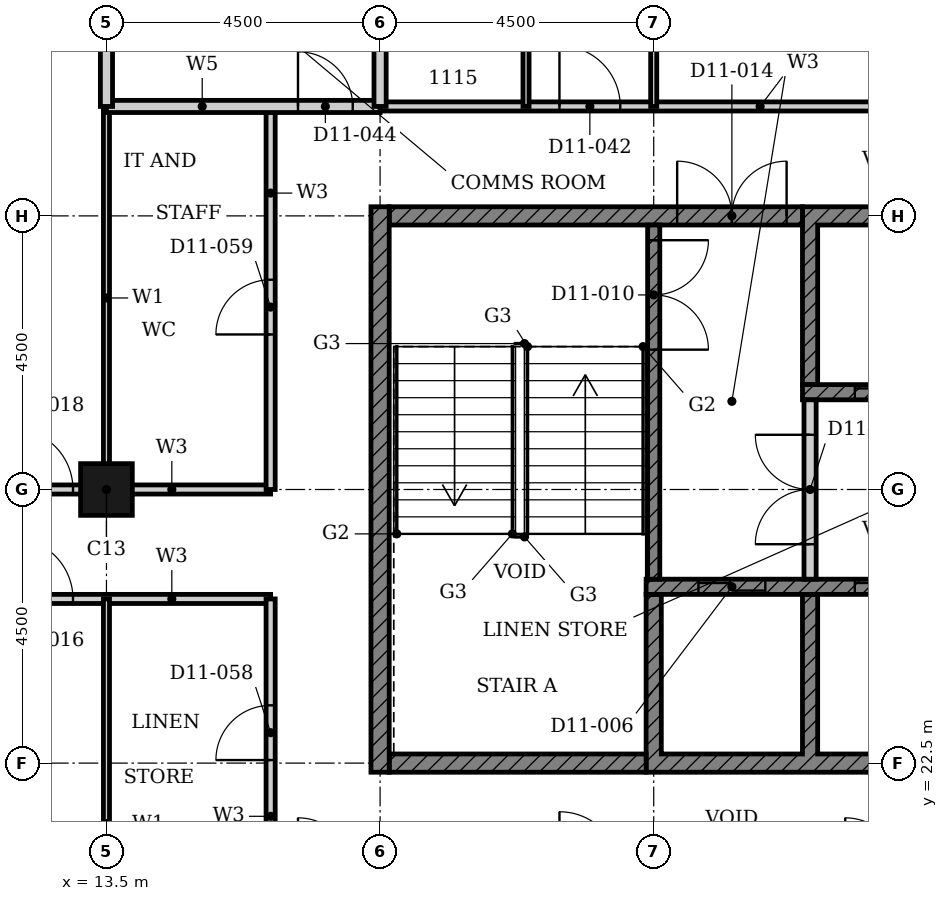
"""IFC4 building model, lengths in metres.
Left out: names, types, materials, properties, quantities, classifications, styles, units other than length and angle.
Written with IfcOpenShell. Run it as: python <this file> out.ifc"""

import sys

from ifc_helpers import new_model, si_unit, direction, frame, frame_2d, origin, origin_2d, place, context, subcontext, project, spatial, polyline, rectangle, hollow_rectangle, outline, extrude, element, fill, save


model = new_model("IFC4")
c1 = context("Model", 3, precision=1e-05, world=origin(), true_north=direction((0.0, 1.0)))
c2 = subcontext(c1, "Body", "Model", "MODEL_VIEW")
j1 = project(units=[si_unit("LENGTHUNIT", "METRE"), si_unit("PLANEANGLEUNIT", "RADIAN")], contexts=[c1])
p1 = place(None, origin())
s1 = spatial("IfcSite", under=j1, at=p1, CompositionType="ELEMENT")
p2 = place(p1, origin())
s2 = spatial("IfcBuilding", under=s1, at=p2, CompositionType="ELEMENT")
p3 = place(p2, frame((0.0, 0.0, 52.8)))
s3 = spatial("IfcBuildingStorey", under=s2, at=p3, CompositionType="ELEMENT", Elevation=52.8)
p4 = place(p3, frame((13.5, 27.0, 0.0), z_axis=(0.0, 0.0, 1.0), x_axis=(1.0, 0.0, 0.0)))
e1 = element("IfcColumn", 1, at=p4, inside=s3, PredefinedType="COLUMN", context=c2, shape_type="SweptSolid", body=[
    extrude(hollow_rectangle(XDim=0.85, YDim=0.85, WallThickness=0.026, at=origin_2d()), origin(), (0.0, 0.0, 1.0), 3.6),
])
p5 = place(p3, origin())
e2 = element("IfcWall", 2, at=p5, inside=s3, PredefinedType="SHEAR", context=c2, shape_type="SweptSolid", body=[
    extrude(outline(polyline([(22.375, 22.35), (38.053, 22.35), (38.053, 25.275), (37.803, 25.275), (37.803, 22.65), (35.482, 22.65), (35.482, 25.275), (35.232, 25.275), (35.232, 22.65), (32.911, 22.65), (32.911, 25.275), (32.661, 25.275), (32.661, 22.65), (30.339, 22.65), (30.339, 25.275), (30.089, 25.275), (30.089, 22.65), (27.768, 22.65), (27.768, 25.275), (27.518, 25.275), (27.518, 22.65), (25.197, 22.65), (25.197, 25.275), (24.947, 25.275), (24.947, 22.65), (22.625, 22.65), (22.625, 25.275), (22.375, 25.275), (22.375, 22.35)])), origin(), (0.0, 0.0, 1.0), 3.3),
])
p6 = place(p3, origin())
e3 = element("IfcWall", 3, at=p6, inside=s3, PredefinedType="SHEAR", context=c2, shape_type="SweptSolid", body=[
    extrude(outline(polyline([(24.947, 28.725), (25.197, 28.725), (25.197, 31.35), (27.518, 31.35), (27.518, 28.725), (27.768, 28.725), (27.768, 31.35), (30.089, 31.35), (30.089, 28.725), (30.339, 28.725), (30.339, 31.35), (32.661, 31.35), (32.661, 28.725), (32.911, 28.725), (32.911, 31.35), (35.232, 31.35), (35.232, 28.725), (35.482, 28.725), (35.482, 31.35), (37.803, 31.35), (37.803, 28.725), (38.053, 28.725), (38.053, 31.35), (40.375, 31.35), (40.375, 28.725), (40.625, 28.725), (40.625, 31.65), (24.947, 31.65), (24.947, 28.725)])), origin(), (0.0, 0.0, 1.0), 3.3),
])
p7 = place(p3, frame((18.15, 22.5, 0.0), z_axis=(0.0, 0.0, 1.0), x_axis=(1.0, 0.0, 0.0)))
e4 = element("IfcWall", 4, at=p7, inside=s3, PredefinedType="SHEAR", context=c2, shape_type="SweptSolid", body=[
    extrude(rectangle(XDim=4.225, YDim=0.3, at=frame_2d((2.113, 0.0))), origin(), (0.0, 0.0, 1.0), 3.3),
])
p8 = place(p3, frame((18.15, 31.5, 0.0), z_axis=(0.0, 0.0, 1.0), x_axis=(1.0, 0.0, 0.0)))
e5 = element("IfcWall", 5, at=p8, inside=s3, PredefinedType="SHEAR", context=c2, shape_type="SweptSolid", body=[
    extrude(rectangle(XDim=6.797, YDim=0.3, at=frame_2d((3.398, 0.0))), origin(), (0.0, 0.0, 1.0), 3.3),
])
p9 = place(p8, frame((4.736, 0.0, 0.0)))
e6 = element("IfcOpeningElement", 6, at=p9, cuts=e5, PredefinedType="OPENING", context=c2, shape_type="SweptSolid", body=[
    extrude(rectangle(XDim=1.8, YDim=2.1, at=frame_2d((0.9, 1.05))), frame((0.0, 0.16, 0.0), z_axis=(0.0, -1.0, 0.0), x_axis=(1.0, 0.0, 0.0)), (0.0, 0.0, 1.0), 0.32),
])
p10 = place(p3, frame((18.0, 22.35, 0.0), z_axis=(0.0, 0.0, 1.0), x_axis=(0.0, 1.0, 0.0)))
e7 = element("IfcWall", 7, at=p10, inside=s3, PredefinedType="SHEAR", context=c2, shape_type="SweptSolid", body=[
    extrude(rectangle(XDim=9.3, YDim=0.3, at=frame_2d((4.65, 0.0))), origin(), (0.0, 0.0, 1.0), 3.3),
])
p11 = place(p3, frame((22.375, 25.4, 0.0), z_axis=(0.0, 0.0, 1.0), x_axis=(1.0, 0.0, 0.0)))
e8 = element("IfcWall", 8, at=p11, inside=s3, PredefinedType="SHEAR", context=c2, shape_type="SweptSolid", body=[
    extrude(rectangle(XDim=15.678, YDim=0.25, at=frame_2d((7.839, 0.0))), origin(), (0.0, 0.0, 1.0), 3.3),
])
p12 = place(p11, frame((3.432, 0.0, 0.0)))
e9 = element("IfcOpeningElement", 9, at=p12, cuts=e8, PredefinedType="OPENING", context=c2, shape_type="SweptSolid", body=[
    extrude(rectangle(XDim=1.1, YDim=2.1, at=frame_2d((0.55, 1.05))), frame((0.0, 0.135, 0.0), z_axis=(0.0, -1.0, 0.0), x_axis=(1.0, 0.0, 0.0)), (0.0, 0.0, 1.0), 0.27),
])
p13 = place(p11, frame((11.146, 0.0, 0.0)))
e10 = element("IfcOpeningElement", 10, at=p13, cuts=e8, PredefinedType="OPENING", context=c2, shape_type="SweptSolid", body=[
    extrude(rectangle(XDim=1.1, YDim=2.1, at=frame_2d((0.55, 1.05))), frame((0.0, 0.135, 0.0), z_axis=(0.0, -1.0, 0.0), x_axis=(1.0, 0.0, 0.0)), (0.0, 0.0, 1.0), 0.27),
])
p14 = place(p11, frame((13.718, 0.0, 0.0)))
e11 = element("IfcOpeningElement", 11, at=p14, cuts=e8, PredefinedType="OPENING", context=c2, shape_type="SweptSolid", body=[
    extrude(rectangle(XDim=1.1, YDim=2.1, at=frame_2d((0.55, 1.05))), frame((0.0, 0.135, 0.0), z_axis=(0.0, -1.0, 0.0), x_axis=(1.0, 0.0, 0.0)), (0.0, 0.0, 1.0), 0.27),
])
p15 = place(p11, frame((0.861, 0.0, 0.0)))
e12 = element("IfcOpeningElement", 12, at=p15, cuts=e8, PredefinedType="OPENING", context=c2, shape_type="SweptSolid", body=[
    extrude(rectangle(XDim=1.1, YDim=2.1, at=frame_2d((0.55, 1.05))), frame((0.0, 0.135, 0.0), z_axis=(0.0, -1.0, 0.0), x_axis=(1.0, 0.0, 0.0)), (0.0, 0.0, 1.0), 0.27),
])
p16 = place(p3, frame((24.947, 28.6, 0.0), z_axis=(0.0, 0.0, 1.0), x_axis=(1.0, 0.0, 0.0)))
e13 = element("IfcWall", 13, at=p16, inside=s3, PredefinedType="SHEAR", context=c2, shape_type="SweptSolid", body=[
    extrude(rectangle(XDim=15.678, YDim=0.25, at=frame_2d((7.839, 0.0))), origin(), (0.0, 0.0, 1.0), 3.3),
])
p17 = place(p16, frame((0.861, 0.0, 0.0)))
e14 = element("IfcOpeningElement", 14, at=p17, cuts=e13, PredefinedType="OPENING", context=c2, shape_type="SweptSolid", body=[
    extrude(rectangle(XDim=1.1, YDim=2.1, at=frame_2d((0.55, 1.05))), frame((0.0, 0.135, 0.0), z_axis=(0.0, -1.0, 0.0), x_axis=(1.0, 0.0, 0.0)), (0.0, 0.0, 1.0), 0.27),
])
p18 = place(p16, frame((8.575, 0.0, 0.0)))
e15 = element("IfcOpeningElement", 15, at=p18, cuts=e13, PredefinedType="OPENING", context=c2, shape_type="SweptSolid", body=[
    extrude(rectangle(XDim=1.1, YDim=2.1, at=frame_2d((0.55, 1.05))), frame((0.0, 0.135, 0.0), z_axis=(0.0, -1.0, 0.0), x_axis=(1.0, 0.0, 0.0)), (0.0, 0.0, 1.0), 0.27),
])
p19 = place(p16, frame((13.718, 0.0, 0.0)))
e16 = element("IfcOpeningElement", 16, at=p19, cuts=e13, PredefinedType="OPENING", context=c2, shape_type="SweptSolid", body=[
    extrude(rectangle(XDim=1.1, YDim=2.1, at=frame_2d((0.55, 1.05))), frame((0.0, 0.135, 0.0), z_axis=(0.0, -1.0, 0.0), x_axis=(1.0, 0.0, 0.0)), (0.0, 0.0, 1.0), 0.27),
])
p20 = place(p3, frame((22.5, 31.35, 0.0), z_axis=(0.0, 0.0, 1.0), x_axis=(0.0, -1.0, 0.0)))
e17 = element("IfcWall", 17, at=p20, inside=s3, PredefinedType="SHEAR", context=c2, shape_type="SweptSolid", body=[
    extrude(rectangle(XDim=5.825, YDim=0.2, at=frame_2d((2.913, 0.0))), origin(), (0.0, 0.0, 1.0), 3.3),
])
p21 = place(p20, frame((0.25, 0.0, 0.0)))
e18 = element("IfcOpeningElement", 18, at=p21, cuts=e17, PredefinedType="OPENING", context=c2, shape_type="SweptSolid", body=[
    extrude(rectangle(XDim=1.8, YDim=2.1, at=frame_2d((0.9, 1.05))), frame((0.0, 0.11, 0.0), z_axis=(0.0, -1.0, 0.0), x_axis=(1.0, 0.0, 0.0)), (0.0, 0.0, 1.0), 0.22),
])
p22 = place(p3, frame((25.072, 25.525, 0.0), z_axis=(0.0, 0.0, 1.0), x_axis=(0.0, 1.0, 0.0)))
e19 = element("IfcWall", 19, at=p22, inside=s3, PredefinedType="PARTITIONING", context=c2, shape_type="SweptSolid", body=[
    extrude(rectangle(XDim=2.95, YDim=0.2, at=frame_2d((1.475, 0.0))), origin(), (0.0, 0.0, 1.0), 3.3),
])
p23 = place(p22, frame((0.575, 0.0, 0.0)))
e20 = element("IfcOpeningElement", 20, at=p23, cuts=e19, PredefinedType="OPENING", context=c2, shape_type="SweptSolid", body=[
    extrude(rectangle(XDim=1.8, YDim=2.1, at=frame_2d((0.9, 1.05))), frame((0.0, 0.11, 0.0), z_axis=(0.0, -1.0, 0.0), x_axis=(1.0, 0.0, 0.0)), (0.0, 0.0, 1.0), 0.22),
])
p24 = place(p3, frame((9.0, 25.2, 0.0), z_axis=(0.0, 0.0, 1.0), x_axis=(1.0, 0.0, 0.0)))
e21 = element("IfcWall", 21, at=p24, inside=s3, PredefinedType="PARTITIONING", context=c2, shape_type="SweptSolid", body=[
    extrude(rectangle(XDim=7.2, YDim=0.15, at=frame_2d((3.6, 0.0))), origin(), (0.0, 0.0, 1.0), 3.3),
])
p25 = place(p24, frame((2.95, 0.0, 0.0)))
e22 = element("IfcOpeningElement", 22, at=p25, cuts=e21, PredefinedType="OPENING", context=c2, shape_type="SweptSolid", body=[
    extrude(rectangle(XDim=1.0, YDim=2.1, at=frame_2d((0.5, 1.05))), frame((0.0, 0.085, 0.0), z_axis=(0.0, -1.0, 0.0), x_axis=(1.0, 0.0, 0.0)), (0.0, 0.0, 1.0), 0.17),
])
p26 = place(p3, frame((9.0, 27.0, 0.0), z_axis=(0.0, 0.0, 1.0), x_axis=(1.0, 0.0, 0.0)))
e23 = element("IfcWall", 23, at=p26, inside=s3, PredefinedType="PARTITIONING", context=c2, shape_type="SweptSolid", body=[
    extrude(rectangle(XDim=7.2, YDim=0.15, at=frame_2d((3.6, 0.0))), origin(), (0.0, 0.0, 1.0), 2.58),
])
p27 = place(p26, frame((2.95, 0.0, 0.0)))
e24 = element("IfcOpeningElement", 24, at=p27, cuts=e23, PredefinedType="OPENING", context=c2, shape_type="SweptSolid", body=[
    extrude(rectangle(XDim=1.0, YDim=2.1, at=frame_2d((0.5, 1.05))), frame((0.0, 0.085, 0.0), z_axis=(0.0, -1.0, 0.0), x_axis=(1.0, 0.0, 0.0)), (0.0, 0.0, 1.0), 0.17),
])
p28 = place(p3, frame((18.0, 33.3, 0.0), z_axis=(0.0, 0.0, 1.0), x_axis=(1.0, 0.0, 0.0)))
e25 = element("IfcWall", 25, at=p28, inside=s3, PredefinedType="PARTITIONING", context=c2, shape_type="SweptSolid", body=[
    extrude(rectangle(XDim=13.5, YDim=0.15, at=frame_2d((6.75, 0.0))), origin(), (0.0, 0.0, 1.0), 3.3),
])
p29 = place(p28, frame((2.95, 0.0, 0.0)))
e26 = element("IfcOpeningElement", 26, at=p29, cuts=e25, PredefinedType="OPENING", context=c2, shape_type="SweptSolid", body=[
    extrude(rectangle(XDim=1.0, YDim=2.1, at=frame_2d((0.5, 1.05))), frame((0.0, 0.085, 0.0), z_axis=(0.0, -1.0, 0.0), x_axis=(1.0, 0.0, 0.0)), (0.0, 0.0, 1.0), 0.17),
])
p30 = place(p28, frame((8.55, 0.0, 0.0)))
e27 = element("IfcOpeningElement", 27, at=p30, cuts=e25, PredefinedType="OPENING", context=c2, shape_type="SweptSolid", body=[
    extrude(rectangle(XDim=0.9, YDim=2.1, at=frame_2d((0.45, 1.05))), frame((0.0, 0.085, 0.0), z_axis=(0.0, -1.0, 0.0), x_axis=(1.0, 0.0, 0.0)), (0.0, 0.0, 1.0), 0.17),
])
p31 = place(p3, frame((16.2, 27.0, 0.0), z_axis=(0.0, 0.0, 1.0), x_axis=(0.0, 1.0, 0.0)))
e28 = element("IfcWall", 28, at=p31, inside=s3, PredefinedType="PARTITIONING", context=c2, shape_type="SweptSolid", body=[
    extrude(rectangle(XDim=6.3, YDim=0.15, at=frame_2d((3.15, 0.0))), origin(), (0.0, 0.0, 1.0), 3.3),
])
p32 = place(p31, frame((2.55, 0.0, 0.0)))
e29 = element("IfcOpeningElement", 29, at=p32, cuts=e28, PredefinedType="OPENING", context=c2, shape_type="SweptSolid", body=[
    extrude(rectangle(XDim=0.9, YDim=2.1, at=frame_2d((0.45, 1.05))), frame((0.0, 0.085, 0.0), z_axis=(0.0, -1.0, 0.0), x_axis=(1.0, 0.0, 0.0)), (0.0, 0.0, 1.0), 0.17),
])
p33 = place(p3, frame((16.2, 20.7, 0.0), z_axis=(0.0, 0.0, 1.0), x_axis=(0.0, 1.0, 0.0)))
e30 = element("IfcWall", 30, at=p33, inside=s3, PredefinedType="PARTITIONING", context=c2, shape_type="SweptSolid", body=[
    extrude(rectangle(XDim=4.5, YDim=0.15, at=frame_2d((2.25, 0.0))), origin(), (0.0, 0.0, 1.0), 3.3),
])
p34 = place(p33, frame((1.85, 0.0, 0.0)))
e31 = element("IfcOpeningElement", 31, at=p34, cuts=e30, PredefinedType="OPENING", context=c2, shape_type="SweptSolid", body=[
    extrude(rectangle(XDim=0.9, YDim=2.1, at=frame_2d((0.45, 1.05))), frame((0.0, 0.085, 0.0), z_axis=(0.0, -1.0, 0.0), x_axis=(1.0, 0.0, 0.0)), (0.0, 0.0, 1.0), 0.17),
])
p35 = place(p3, frame((13.5, 27.0, 0.0), z_axis=(0.0, 0.0, 1.0), x_axis=(0.0, 1.0, 0.0)))
e32 = element("IfcWall", 32, at=p35, inside=s3, PredefinedType="PARTITIONING", context=c2, shape_type="SweptSolid", body=[
    extrude(rectangle(XDim=6.3, YDim=0.1, at=frame_2d((3.15, 0.0))), origin(), (0.0, 0.0, 1.0), 2.38),
])
p36 = place(p3, frame((13.5, 17.81, 0.0), z_axis=(0.0, 0.0, 1.0), x_axis=(0.0, 1.0, 0.0)))
e33 = element("IfcWall", 33, at=p36, inside=s3, PredefinedType="PARTITIONING", context=c2, shape_type="SweptSolid", body=[
    extrude(rectangle(XDim=7.39, YDim=0.1, at=frame_2d((3.695, 0.0))), origin(), (0.0, 0.0, 1.0), 2.38),
])
p37 = place(p3, frame((22.5, 33.3, 0.0), z_axis=(0.0, 0.0, 1.0), x_axis=(0.0, 1.0, 0.0)))
e34 = element("IfcWall", 34, at=p37, inside=s3, PredefinedType="PARTITIONING", context=c2, shape_type="SweptSolid", body=[
    extrude(rectangle(XDim=7.39, YDim=0.1, at=frame_2d((3.695, 0.0))), origin(), (0.0, 0.0, 1.0), 3.3),
])
p38 = place(p3, frame((20.4, 33.3, 0.0), z_axis=(0.0, 0.0, 1.0), x_axis=(0.0, 1.0, 0.0)))
e35 = element("IfcWall", 35, at=p38, inside=s3, PredefinedType="PARTITIONING", context=c2, shape_type="SweptSolid", body=[
    extrude(rectangle(XDim=2.7, YDim=0.1, at=frame_2d((1.35, 0.0))), origin(), (0.0, 0.0, 1.0), 3.3),
])
p39 = place(p3, frame((13.5, 33.3, 0.0), z_axis=(0.0, 0.0, 1.0), x_axis=(1.0, 0.0, 0.0)))
e36 = element("IfcWall", 36, at=p39, inside=s3, PredefinedType="PARTITIONING", context=c2, shape_type="SweptSolid", body=[
    extrude(rectangle(XDim=4.5, YDim=0.2, at=frame_2d((2.25, 0.0))), origin(), (0.0, 0.0, 1.0), 3.3),
])
p40 = place(p39, frame((3.15, 0.0, 0.0)))
e37 = element("IfcOpeningElement", 37, at=p40, cuts=e36, PredefinedType="OPENING", context=c2, shape_type="SweptSolid", body=[
    extrude(rectangle(XDim=0.9, YDim=2.1, at=frame_2d((0.45, 1.05))), frame((0.0, 0.11, 0.0), z_axis=(0.0, -1.0, 0.0), x_axis=(1.0, 0.0, 0.0)), (0.0, 0.0, 1.0), 0.22),
])
p41 = place(p3, frame((13.5, 33.3, 0.0), z_axis=(0.0, 0.0, 1.0), x_axis=(0.0, 1.0, 0.0)))
e38 = element("IfcWall", 38, at=p41, inside=s3, PredefinedType="PARTITIONING", context=c2, shape_type="SweptSolid", body=[
    extrude(rectangle(XDim=2.89, YDim=0.2, at=frame_2d((1.445, 0.0))), origin(), (0.0, 0.0, 1.0), 2.38),
])
p42 = place(p3, frame((18.0, 33.3, 0.0), z_axis=(0.0, 0.0, 1.0), x_axis=(0.0, 1.0, 0.0)))
e39 = element("IfcWall", 39, at=p42, inside=s3, PredefinedType="PARTITIONING", context=c2, shape_type="SweptSolid", body=[
    extrude(rectangle(XDim=5.14, YDim=0.2, at=frame_2d((2.57, 0.0))), origin(), (0.0, 0.0, 1.0), 3.3),
])
p43 = place(p12, origin())
e40 = element("IfcDoor", 40, at=p43, inside=s3, OperationType="DOUBLE_DOOR_SLIDING", PredefinedType="DOOR", context=c2, shape_type="SweptSolid", body=[
    extrude(rectangle(XDim=1.1, YDim=2.1, at=frame_2d((0.55, 1.05))), frame((0.0, 0.025, 0.0), z_axis=(0.0, -1.0, 0.0), x_axis=(1.0, 0.0, 0.0)), (0.0, 0.0, 1.0), 0.05),
])
fill(e9, e40)
p44 = place(p17, origin())
e41 = element("IfcDoor", 41, at=p44, inside=s3, OperationType="DOUBLE_DOOR_SLIDING", PredefinedType="DOOR", context=c2, shape_type="SweptSolid", body=[
    extrude(rectangle(XDim=1.1, YDim=2.1, at=frame_2d((0.55, 1.05))), frame((0.0, 0.025, 0.0), z_axis=(0.0, -1.0, 0.0), x_axis=(1.0, 0.0, 0.0)), (0.0, 0.0, 1.0), 0.05),
])
fill(e14, e41)
p45 = place(p15, origin())
e42 = element("IfcDoor", 42, at=p45, inside=s3, OperationType="DOUBLE_DOOR_SLIDING", PredefinedType="DOOR", context=c2, shape_type="SweptSolid", body=[
    extrude(rectangle(XDim=1.1, YDim=2.1, at=frame_2d((0.55, 1.05))), frame((0.0, 0.025, 0.0), z_axis=(0.0, -1.0, 0.0), x_axis=(1.0, 0.0, 0.0)), (0.0, 0.0, 1.0), 0.05),
])
fill(e12, e42)
p46 = place(p21, origin())
e43 = element("IfcDoor", 43, at=p46, inside=s3, OperationType="DOUBLE_DOOR_SINGLE_SWING", PredefinedType="DOOR", context=c2, shape_type="SweptSolid", body=[
    extrude(rectangle(XDim=1.8, YDim=2.1, at=frame_2d((0.9, 1.05))), frame((0.0, 0.025, 0.0), z_axis=(0.0, -1.0, 0.0), x_axis=(1.0, 0.0, 0.0)), (0.0, 0.0, 1.0), 0.05),
])
fill(e18, e43)
p47 = place(p23, origin())
e44 = element("IfcDoor", 44, at=p47, inside=s3, OperationType="DOUBLE_DOOR_SINGLE_SWING", PredefinedType="DOOR", context=c2, shape_type="SweptSolid", body=[
    extrude(rectangle(XDim=1.8, YDim=2.1, at=frame_2d((0.9, 1.05))), frame((0.0, 0.025, 0.0), z_axis=(0.0, -1.0, 0.0), x_axis=(1.0, 0.0, 0.0)), (0.0, 0.0, 1.0), 0.05),
])
fill(e20, e44)
p48 = place(p9, origin())
e45 = element("IfcDoor", 45, at=p48, inside=s3, OperationType="DOUBLE_DOOR_SINGLE_SWING", PredefinedType="DOOR", context=c2, shape_type="SweptSolid", body=[
    extrude(rectangle(XDim=1.8, YDim=2.1, at=frame_2d((0.9, 1.05))), frame((0.0, 0.025, 0.0), z_axis=(0.0, -1.0, 0.0), x_axis=(1.0, 0.0, 0.0)), (0.0, 0.0, 1.0), 0.05),
])
fill(e6, e45)
p49 = place(p25, origin())
e46 = element("IfcDoor", 46, at=p49, inside=s3, OperationType="SINGLE_SWING_RIGHT", PredefinedType="DOOR", context=c2, shape_type="SweptSolid", body=[
    extrude(rectangle(XDim=1.0, YDim=2.1, at=frame_2d((0.5, 1.05))), frame((0.0, 0.025, 0.0), z_axis=(0.0, -1.0, 0.0), x_axis=(1.0, 0.0, 0.0)), (0.0, 0.0, 1.0), 0.05),
])
fill(e22, e46)
p50 = place(p27, origin())
e47 = element("IfcDoor", 47, at=p50, inside=s3, OperationType="SINGLE_SWING_RIGHT", PredefinedType="DOOR", context=c2, shape_type="SweptSolid", body=[
    extrude(rectangle(XDim=1.0, YDim=2.1, at=frame_2d((0.5, 1.05))), frame((0.0, 0.025, 0.0), z_axis=(0.0, -1.0, 0.0), x_axis=(1.0, 0.0, 0.0)), (0.0, 0.0, 1.0), 0.05),
])
fill(e24, e47)
p51 = place(p29, origin())
e48 = element("IfcDoor", 48, at=p51, inside=s3, OperationType="SINGLE_SWING_RIGHT", PredefinedType="DOOR", context=c2, shape_type="SweptSolid", body=[
    extrude(rectangle(XDim=1.0, YDim=2.1, at=frame_2d((0.5, 1.05))), frame((0.0, 0.025, 0.0), z_axis=(0.0, -1.0, 0.0), x_axis=(1.0, 0.0, 0.0)), (0.0, 0.0, 1.0), 0.05),
])
fill(e26, e48)
p52 = place(p40, origin())
e49 = element("IfcDoor", 49, at=p52, inside=s3, OperationType="SINGLE_SWING_RIGHT", PredefinedType="DOOR", context=c2, shape_type="SweptSolid", body=[
    extrude(rectangle(XDim=0.9, YDim=2.1, at=frame_2d((0.45, 1.05))), frame((0.0, 0.025, 0.0), z_axis=(0.0, -1.0, 0.0), x_axis=(1.0, 0.0, 0.0)), (0.0, 0.0, 1.0), 0.05),
])
fill(e37, e49)
p53 = place(p34, origin())
e50 = element("IfcDoor", 50, at=p53, inside=s3, OperationType="SINGLE_SWING_RIGHT", PredefinedType="DOOR", context=c2, shape_type="SweptSolid", body=[
    extrude(rectangle(XDim=0.9, YDim=2.1, at=frame_2d((0.45, 1.05))), frame((0.0, 0.025, 0.0), z_axis=(0.0, -1.0, 0.0), x_axis=(1.0, 0.0, 0.0)), (0.0, 0.0, 1.0), 0.05),
])
fill(e31, e50)
p54 = place(p32, origin())
e51 = element("IfcDoor", 51, at=p54, inside=s3, OperationType="SINGLE_SWING_LEFT", PredefinedType="DOOR", context=c2, shape_type="SweptSolid", body=[
    extrude(rectangle(XDim=0.9, YDim=2.1, at=frame_2d((0.45, 1.05))), frame((0.0, 0.025, 0.0), z_axis=(0.0, -1.0, 0.0), x_axis=(1.0, 0.0, 0.0)), (0.0, 0.0, 1.0), 0.05),
])
fill(e29, e51)
save(model, sys.argv[1])
